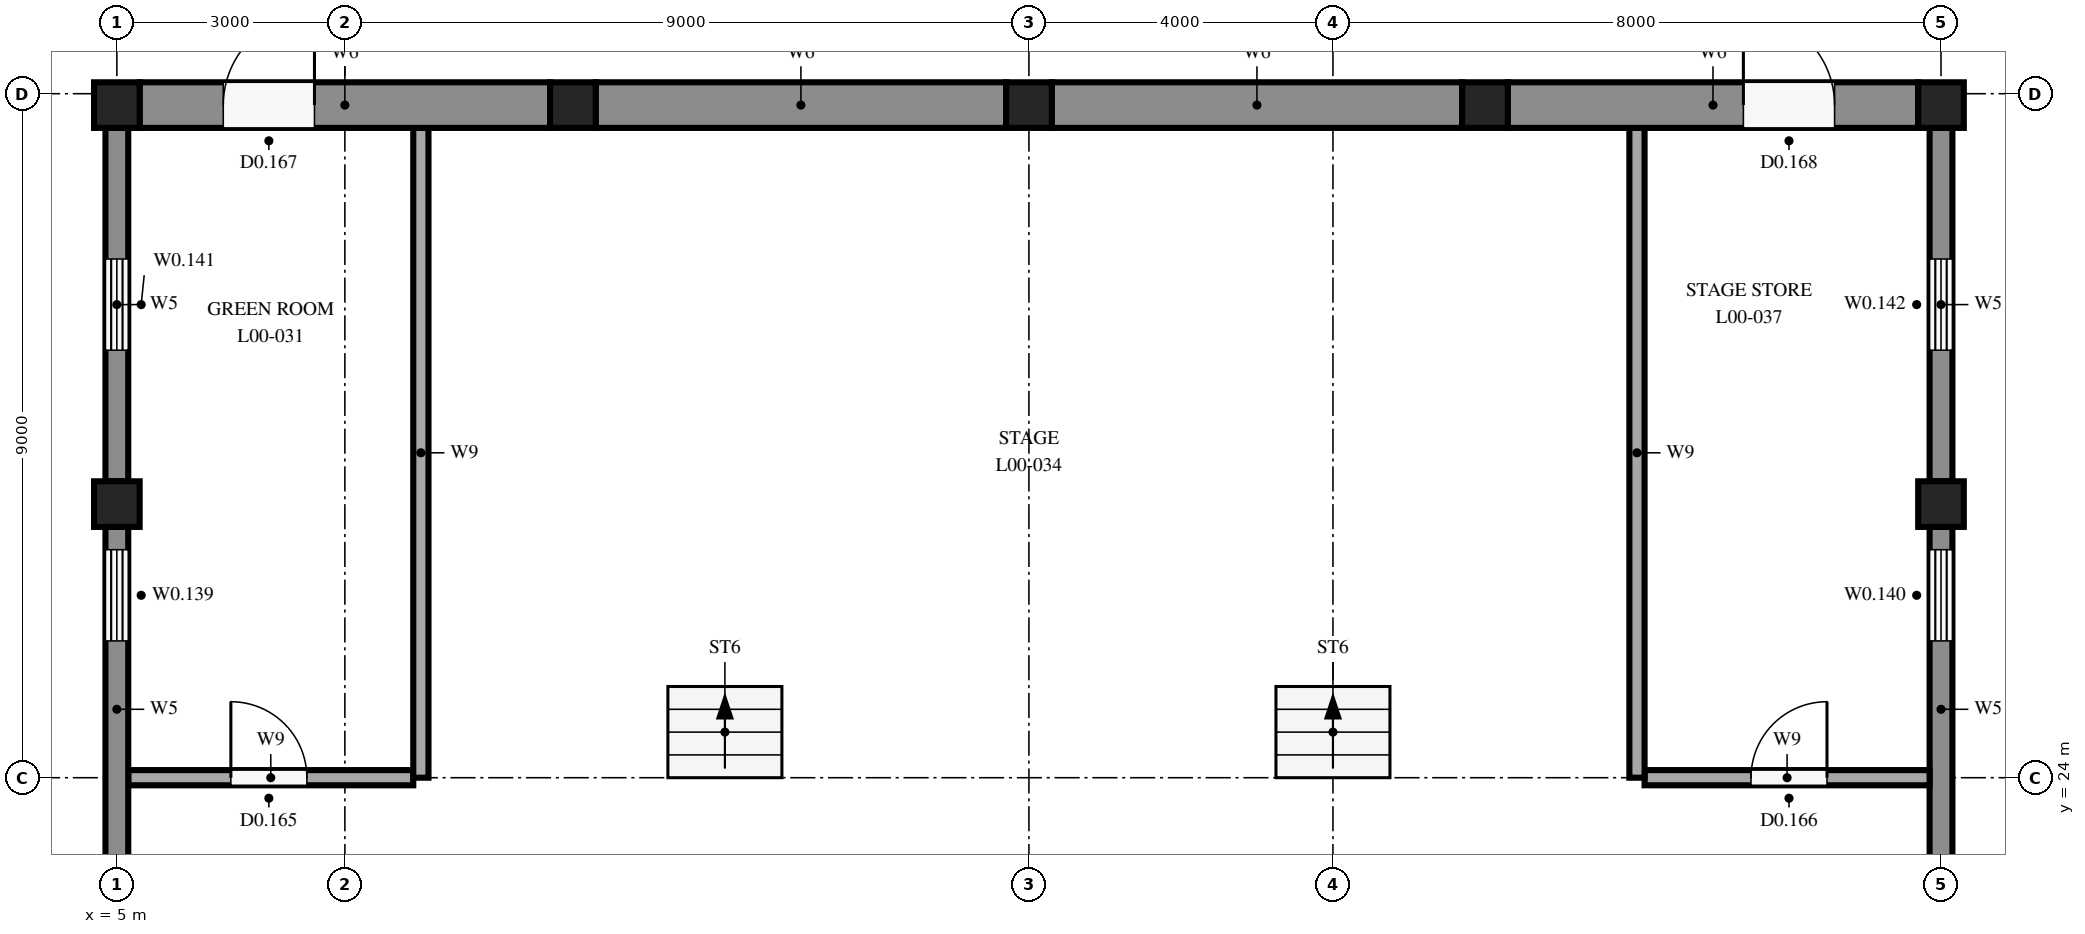
"""IFC4 building model, lengths in metres.
Left out: names, types, materials, properties, quantities, classifications, styles, units other than length and angle.
Written with IfcOpenShell. Run it as: python <this file> out.ifc"""

import sys

from ifc_helpers import new_model, si_unit, direction, frame, frame_2d, origin, origin_2d, place, context, subcontext, project, spatial, rectangle, extrude, element, fill, save


model = new_model("IFC4")
c1 = context("Model", 3, precision=1e-05, world=origin(), true_north=direction((0.0, 1.0)))
c2 = subcontext(c1, "Body", "Model", "MODEL_VIEW")
j1 = project(units=[si_unit("LENGTHUNIT", "METRE"), si_unit("PLANEANGLEUNIT", "RADIAN")], contexts=[c1])
p1 = place(None, origin())
s1 = spatial("IfcSite", under=j1, at=p1, CompositionType="ELEMENT")
p2 = place(p1, origin())
s2 = spatial("IfcBuilding", under=s1, at=p2, CompositionType="ELEMENT")
p3 = place(p2, origin())
s3 = spatial("IfcBuildingStorey", under=s2, at=p3, CompositionType="ELEMENT", Elevation=0.0)
for number, where, z_axis, x_axis in (
    (1, (5.0, 27.6, 0.0), (0.0, 0.0, 1.0), (1.0, 0.0, 0.0)),
    (2, (5.0, 32.85, 0.0), (0.0, 0.0, 1.0), (1.0, 0.0, 0.0)),
    (3, (11.0, 32.85, 0.0), (0.0, 0.0, 1.0), (1.0, 0.0, 0.0)),
    (4, (17.0, 32.85, 0.0), (0.0, 0.0, 1.0), (1.0, 0.0, 0.0)),
    (5, (23.0, 32.85, 0.0), (0.0, 0.0, 1.0), (1.0, 0.0, 0.0)),
    (6, (29.0, 27.6, 0.0), (0.0, 0.0, 1.0), (1.0, 0.0, 0.0)),
    (7, (29.0, 32.85, 0.0), (0.0, 0.0, 1.0), (1.0, 0.0, 0.0)),
):
    element("IfcColumn", number, at=place(p3, frame(where, z_axis=z_axis, x_axis=x_axis)), inside=s3, PredefinedType="COLUMN", context=c2, shape_type="SweptSolid", body=[
        extrude(rectangle(XDim=0.6, YDim=0.6, at=origin_2d()), origin(), (0.0, 0.0, 1.0), 4.5),
    ])
p4 = place(p3, frame((5.0, 22.5, 0.0), z_axis=(0.0, 0.0, 1.0), x_axis=(0.0, 1.0, 0.0)))
e8 = element("IfcWall", 8, at=p4, inside=s3, PredefinedType="SOLIDWALL", context=c2, shape_type="SweptSolid", body=[
    extrude(rectangle(XDim=4.8, YDim=0.3, at=frame_2d((2.4, 0.0))), origin(), (0.0, 0.0, 1.0), 4.5),
])
p5 = place(p4, frame((3.3, 0.0, 1.0)))
e9 = element("IfcOpeningElement", 9, at=p5, cuts=e8, PredefinedType="OPENING", context=c2, shape_type="SweptSolid", body=[
    extrude(rectangle(XDim=1.2, YDim=1.5, at=frame_2d((0.6, 0.75))), frame((0.0, 0.16, 0.0), z_axis=(0.0, -1.0, 0.0), x_axis=(1.0, 0.0, 0.0)), (0.0, 0.0, 1.0), 0.32),
])
p6 = place(p3, frame((5.0, 27.9, 0.0), z_axis=(0.0, 0.0, 1.0), x_axis=(0.0, 1.0, 0.0)))
e10 = element("IfcWall", 10, at=p6, inside=s3, PredefinedType="SOLIDWALL", context=c2, shape_type="SweptSolid", body=[
    extrude(rectangle(XDim=4.65, YDim=0.3, at=frame_2d((2.325, 0.0))), origin(), (0.0, 0.0, 1.0), 4.5),
])
p7 = place(p6, frame((1.725, 0.0, 1.0)))
e11 = element("IfcOpeningElement", 11, at=p7, cuts=e10, PredefinedType="OPENING", context=c2, shape_type="SweptSolid", body=[
    extrude(rectangle(XDim=1.2, YDim=1.5, at=frame_2d((0.6, 0.75))), frame((0.0, 0.16, 0.0), z_axis=(0.0, -1.0, 0.0), x_axis=(1.0, 0.0, 0.0)), (0.0, 0.0, 1.0), 0.32),
])
p8 = place(p3, frame((29.0, 27.3, 0.0), z_axis=(0.0, 0.0, 1.0), x_axis=(0.0, -1.0, 0.0)))
e12 = element("IfcWall", 12, at=p8, inside=s3, PredefinedType="SOLIDWALL", context=c2, shape_type="SweptSolid", body=[
    extrude(rectangle(XDim=4.8, YDim=0.3, at=frame_2d((2.4, 0.0))), origin(), (0.0, 0.0, 1.0), 4.5),
])
p9 = place(p8, frame((0.3, 0.0, 1.0)))
e13 = element("IfcOpeningElement", 13, at=p9, cuts=e12, PredefinedType="OPENING", context=c2, shape_type="SweptSolid", body=[
    extrude(rectangle(XDim=1.2, YDim=1.5, at=frame_2d((0.6, 0.75))), frame((0.0, 0.16, 0.0), z_axis=(0.0, -1.0, 0.0), x_axis=(1.0, 0.0, 0.0)), (0.0, 0.0, 1.0), 0.32),
])
p10 = place(p3, frame((29.0, 32.55, 0.0), z_axis=(0.0, 0.0, 1.0), x_axis=(0.0, -1.0, 0.0)))
e14 = element("IfcWall", 14, at=p10, inside=s3, PredefinedType="SOLIDWALL", context=c2, shape_type="SweptSolid", body=[
    extrude(rectangle(XDim=4.65, YDim=0.3, at=frame_2d((2.325, 0.0))), origin(), (0.0, 0.0, 1.0), 4.5),
])
p11 = place(p10, frame((1.725, 0.0, 1.0)))
e15 = element("IfcOpeningElement", 15, at=p11, cuts=e14, PredefinedType="OPENING", context=c2, shape_type="SweptSolid", body=[
    extrude(rectangle(XDim=1.2, YDim=1.5, at=frame_2d((0.6, 0.75))), frame((0.0, 0.16, 0.0), z_axis=(0.0, -1.0, 0.0), x_axis=(1.0, 0.0, 0.0)), (0.0, 0.0, 1.0), 0.32),
])
p12 = place(p3, frame((5.3, 32.85, 0.0), z_axis=(0.0, 0.0, 1.0), x_axis=(1.0, 0.0, 0.0)))
e16 = element("IfcWall", 16, at=p12, inside=s3, PredefinedType="SOLIDWALL", context=c2, shape_type="SweptSolid", body=[
    extrude(rectangle(XDim=5.4, YDim=0.6, at=frame_2d((2.7, 0.0))), origin(), (0.0, 0.0, 1.0), 4.5),
])
p13 = place(p12, frame((1.1, 0.0, 0.0)))
e17 = element("IfcOpeningElement", 17, at=p13, cuts=e16, PredefinedType="OPENING", context=c2, shape_type="SweptSolid", body=[
    extrude(rectangle(XDim=1.2, YDim=2.4, at=frame_2d((0.6, 1.2))), frame((0.0, 0.31, 0.0), z_axis=(0.0, -1.0, 0.0), x_axis=(1.0, 0.0, 0.0)), (0.0, 0.0, 1.0), 0.62),
])
for number, where, z_axis, x_axis in (
    (18, (11.3, 32.85, 0.0), (0.0, 0.0, 1.0), (1.0, 0.0, 0.0)),
    (19, (17.3, 32.85, 0.0), (0.0, 0.0, 1.0), (1.0, 0.0, 0.0)),
):
    element("IfcWall", number, at=place(p3, frame(where, z_axis=z_axis, x_axis=x_axis)), inside=s3, PredefinedType="SOLIDWALL", context=c2, shape_type="SweptSolid", body=[
        extrude(rectangle(XDim=5.4, YDim=0.6, at=frame_2d((2.7, 0.0))), origin(), (0.0, 0.0, 1.0), 4.5),
    ])
p14 = place(p3, frame((23.3, 32.85, 0.0), z_axis=(0.0, 0.0, 1.0), x_axis=(1.0, 0.0, 0.0)))
e20 = element("IfcWall", 20, at=p14, inside=s3, PredefinedType="SOLIDWALL", context=c2, shape_type="SweptSolid", body=[
    extrude(rectangle(XDim=5.4, YDim=0.6, at=frame_2d((2.7, 0.0))), origin(), (0.0, 0.0, 1.0), 4.5),
])
p15 = place(p14, frame((3.1, 0.0, 0.0)))
e21 = element("IfcOpeningElement", 21, at=p15, cuts=e20, PredefinedType="OPENING", context=c2, shape_type="SweptSolid", body=[
    extrude(rectangle(XDim=1.2, YDim=2.4, at=frame_2d((0.6, 1.2))), frame((0.0, 0.31, 0.0), z_axis=(0.0, -1.0, 0.0), x_axis=(1.0, 0.0, 0.0)), (0.0, 0.0, 1.0), 0.62),
])
for number, where, z_axis, x_axis in (
    (22, (9.0, 24.0, 0.0), (0.0, 0.0, 1.0), (0.0, 1.0, 0.0)),
    (23, (25.0, 24.0, 0.0), (0.0, 0.0, 1.0), (0.0, 1.0, 0.0)),
):
    element("IfcWall", number, at=place(p3, frame(where, z_axis=z_axis, x_axis=x_axis)), inside=s3, PredefinedType="SOLIDWALL", context=c2, shape_type="SweptSolid", body=[
        extrude(rectangle(XDim=8.55, YDim=0.2, at=frame_2d((4.275, 0.0))), origin(), (0.0, 0.0, 1.0), 4.2),
    ])
p16 = place(p3, frame((5.15, 24.0, 0.0), z_axis=(0.0, 0.0, 1.0), x_axis=(1.0, 0.0, 0.0)))
e24 = element("IfcWall", 24, at=p16, inside=s3, PredefinedType="SOLIDWALL", context=c2, shape_type="SweptSolid", body=[
    extrude(rectangle(XDim=3.75, YDim=0.2, at=frame_2d((1.875, 0.0))), origin(), (0.0, 0.0, 1.0), 4.2),
])
p17 = place(p16, frame((1.35, 0.0, 0.0)))
e25 = element("IfcOpeningElement", 25, at=p17, cuts=e24, PredefinedType="OPENING", context=c2, shape_type="SweptSolid", body=[
    extrude(rectangle(XDim=1.0, YDim=2.1, at=frame_2d((0.5, 1.05))), frame((0.0, 0.11, 0.0), z_axis=(0.0, -1.0, 0.0), x_axis=(1.0, 0.0, 0.0)), (0.0, 0.0, 1.0), 0.22),
])
p18 = place(p3, frame((25.1, 24.0, 0.0), z_axis=(0.0, 0.0, 1.0), x_axis=(1.0, 0.0, 0.0)))
e26 = element("IfcWall", 26, at=p18, inside=s3, PredefinedType="SOLIDWALL", context=c2, shape_type="SweptSolid", body=[
    extrude(rectangle(XDim=3.75, YDim=0.2, at=frame_2d((1.875, 0.0))), origin(), (0.0, 0.0, 1.0), 4.2),
])
p19 = place(p18, frame((1.4, 0.0, 0.0)))
e27 = element("IfcOpeningElement", 27, at=p19, cuts=e26, PredefinedType="OPENING", context=c2, shape_type="SweptSolid", body=[
    extrude(rectangle(XDim=1.0, YDim=2.1, at=frame_2d((0.5, 1.05))), frame((0.0, 0.11, 0.0), z_axis=(0.0, -1.0, 0.0), x_axis=(1.0, 0.0, 0.0)), (0.0, 0.0, 1.0), 0.22),
])
p20 = place(p13, origin())
e28 = element("IfcDoor", 28, at=p20, inside=s3, OperationType="SINGLE_SWING_RIGHT", PredefinedType="NOTDEFINED", context=c2, shape_type="SweptSolid", body=[
    extrude(rectangle(XDim=1.2, YDim=2.4, at=frame_2d((0.6, 1.2))), frame((0.0, 0.025, 0.0), z_axis=(0.0, -1.0, 0.0), x_axis=(1.0, 0.0, 0.0)), (0.0, 0.0, 1.0), 0.05),
])
fill(e17, e28)
p21 = place(p15, origin())
e29 = element("IfcDoor", 29, at=p21, inside=s3, OperationType="SINGLE_SWING_LEFT", PredefinedType="NOTDEFINED", context=c2, shape_type="SweptSolid", body=[
    extrude(rectangle(XDim=1.2, YDim=2.4, at=frame_2d((0.6, 1.2))), frame((0.0, 0.025, 0.0), z_axis=(0.0, -1.0, 0.0), x_axis=(1.0, 0.0, 0.0)), (0.0, 0.0, 1.0), 0.05),
])
fill(e21, e29)
p22 = place(p5, origin())
e30 = element("IfcWindow", 30, at=p22, inside=s3, PartitioningType="SINGLE_PANEL", PredefinedType="WINDOW", context=c2, shape_type="SweptSolid", body=[
    extrude(rectangle(XDim=1.2, YDim=1.5, at=frame_2d((0.6, 0.75))), frame((0.0, 0.03, 0.0), z_axis=(0.0, -1.0, 0.0), x_axis=(1.0, 0.0, 0.0)), (0.0, 0.0, 1.0), 0.06),
])
fill(e9, e30)
p23 = place(p7, origin())
e31 = element("IfcWindow", 31, at=p23, inside=s3, PartitioningType="SINGLE_PANEL", PredefinedType="WINDOW", context=c2, shape_type="SweptSolid", body=[
    extrude(rectangle(XDim=1.2, YDim=1.5, at=frame_2d((0.6, 0.75))), frame((0.0, 0.03, 0.0), z_axis=(0.0, -1.0, 0.0), x_axis=(1.0, 0.0, 0.0)), (0.0, 0.0, 1.0), 0.06),
])
fill(e11, e31)
p24 = place(p9, origin())
e32 = element("IfcWindow", 32, at=p24, inside=s3, PartitioningType="SINGLE_PANEL", PredefinedType="WINDOW", context=c2, shape_type="SweptSolid", body=[
    extrude(rectangle(XDim=1.2, YDim=1.5, at=frame_2d((0.6, 0.75))), frame((0.0, 0.03, 0.0), z_axis=(0.0, -1.0, 0.0), x_axis=(1.0, 0.0, 0.0)), (0.0, 0.0, 1.0), 0.06),
])
fill(e13, e32)
p25 = place(p11, origin())
e33 = element("IfcWindow", 33, at=p25, inside=s3, PartitioningType="SINGLE_PANEL", PredefinedType="WINDOW", context=c2, shape_type="SweptSolid", body=[
    extrude(rectangle(XDim=1.2, YDim=1.5, at=frame_2d((0.6, 0.75))), frame((0.0, 0.03, 0.0), z_axis=(0.0, -1.0, 0.0), x_axis=(1.0, 0.0, 0.0)), (0.0, 0.0, 1.0), 0.06),
])
fill(e15, e33)
p26 = place(p17, origin())
e34 = element("IfcDoor", 34, at=p26, inside=s3, OperationType="SINGLE_SWING_LEFT", PredefinedType="NOTDEFINED", context=c2, shape_type="SweptSolid", body=[
    extrude(rectangle(XDim=1.0, YDim=2.1, at=frame_2d((0.5, 1.05))), frame((0.0, 0.025, 0.0), z_axis=(0.0, -1.0, 0.0), x_axis=(1.0, 0.0, 0.0)), (0.0, 0.0, 1.0), 0.05),
])
fill(e25, e34)
p27 = place(p19, origin())
e35 = element("IfcDoor", 35, at=p27, inside=s3, OperationType="SINGLE_SWING_RIGHT", PredefinedType="NOTDEFINED", context=c2, shape_type="SweptSolid", body=[
    extrude(rectangle(XDim=1.0, YDim=2.1, at=frame_2d((0.5, 1.05))), frame((0.0, 0.025, 0.0), z_axis=(0.0, -1.0, 0.0), x_axis=(1.0, 0.0, 0.0)), (0.0, 0.0, 1.0), 0.05),
])
fill(e27, e35)
save(model, sys.argv[1])
